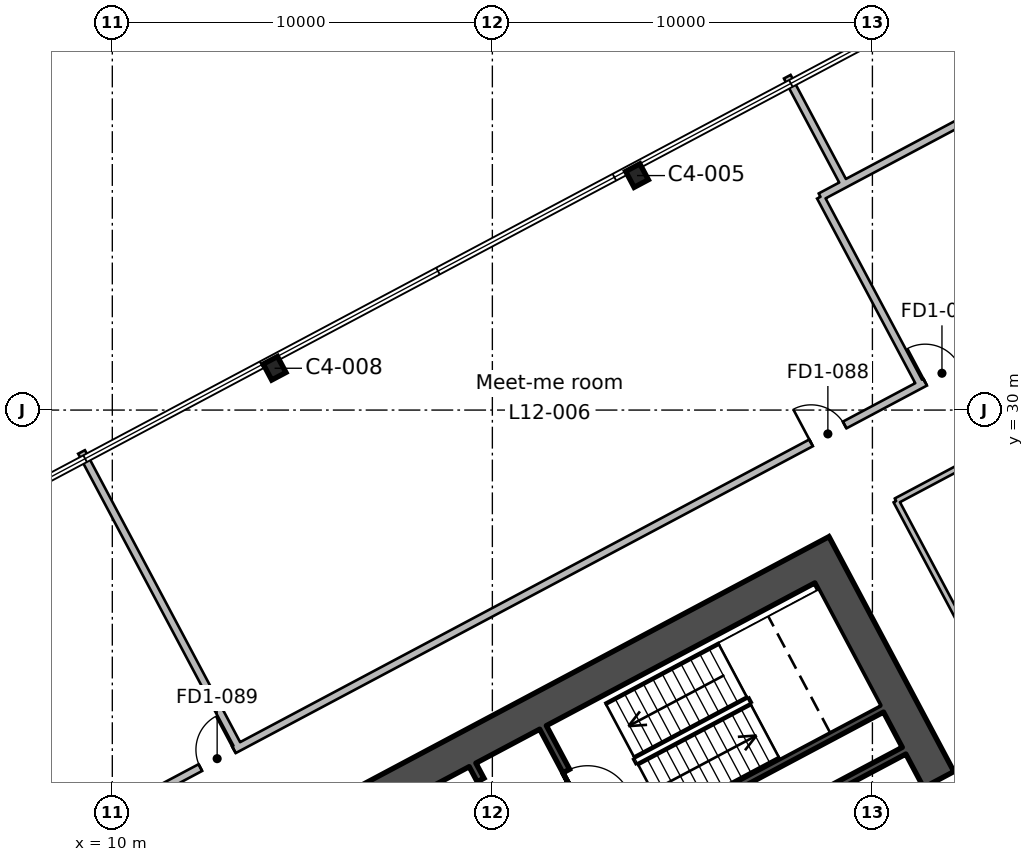
"""IFC4 building model, lengths in metres.
Left out: names, types, materials, properties, quantities, classifications, styles, units other than length and angle.
Written with IfcOpenShell. Run it as: python <this file> out.ifc"""

import sys

from ifc_helpers import new_model, si_unit, direction, frame, frame_2d, origin, origin_2d, place, context, subcontext, project, spatial, rectangle, i_section, extrude, element, fill, save


model = new_model("IFC4")
c1 = context("Model", 3, precision=1e-05, world=origin(), true_north=direction((0.0, 1.0)))
c2 = subcontext(c1, "Body", "Model", "MODEL_VIEW")
j1 = project(units=[si_unit("LENGTHUNIT", "METRE"), si_unit("PLANEANGLEUNIT", "RADIAN")], contexts=[c1])
p1 = place(None, origin())
s1 = spatial("IfcSite", under=j1, at=p1, CompositionType="ELEMENT")
p2 = place(p1, origin())
s2 = spatial("IfcBuilding", under=s1, at=p2, CompositionType="ELEMENT")
p3 = place(p2, frame((0.0, 0.0, 66.2)))
s3 = spatial("IfcBuildingStorey", under=s2, at=p3, CompositionType="ELEMENT", Elevation=66.2)
for number, where, z_axis, x_axis in (
    (1, (14.27, 31.1, 0.0), (0.0, 0.0, 1.0), (-0.883, -0.469, 0.0)),
    (2, (23.806, 36.17, 0.0), (0.0, 0.0, 1.0), (-0.883, -0.469, 0.0)),
):
    element("IfcColumn", number, at=place(p3, frame(where, z_axis=z_axis, x_axis=x_axis)), inside=s3, PredefinedType="COLUMN", context=c2, shape_type="SweptSolid", body=[
        extrude(i_section(OverallWidth=0.424, OverallDepth=0.475, WebThickness=0.048, FlangeThickness=0.077, FilletRadius=0.015, at=origin_2d()), origin(), (0.0, 0.0, 1.0), 4.6),
    ])
p4 = place(p3, frame((37.849, 8.799, 0.0), z_axis=(0.0, 0.0, 1.0), x_axis=(-0.469465789982, 0.882950662289, 0.0)))
e3 = element("IfcWall", 3, at=p4, inside=s3, PredefinedType="SHEAR", context=c2, shape_type="SweptSolid", body=[
    extrude(rectangle(XDim=20.0, YDim=0.9, at=frame_2d((10.0, 0.0))), origin(), (0.0, 0.0, 1.0), 4.6),
])
p5 = place(p4, frame((10.6, 0.0, 0.0)))
e4 = element("IfcOpeningElement", 4, at=p5, cuts=e3, PredefinedType="OPENING", context=c2, shape_type="SweptSolid", body=[
    extrude(rectangle(XDim=2.4, YDim=2.4, at=frame_2d((1.2, 1.2))), frame((0.0, 0.46, 0.0), z_axis=(0.0, -1.0, 0.0), x_axis=(1.0, 0.0, 0.0)), (0.0, 0.0, 1.0), 0.92),
])
p6 = place(p3, frame((10.438, 16.366, 0.0), z_axis=(0.0, 0.0, 1.0), x_axis=(0.88294509198, 0.469476266226, 0.0)))
e5 = element("IfcWall", 5, at=p6, inside=s3, PredefinedType="SHEAR", context=c2, shape_type="SweptSolid", body=[
    extrude(rectangle(XDim=20.2, YDim=0.9, at=frame_2d((10.1, 0.0))), origin(), (0.0, 0.0, 1.0), 4.6),
])
p7 = place(p3, frame((22.906, 14.218, 0.0), z_axis=(0.0, 0.0, 1.0), x_axis=(-0.469480409012, 0.88294288918, 0.0)))
e6 = element("IfcWall", 6, at=p7, inside=s3, PredefinedType="SHEAR", context=c2, shape_type="SweptSolid", body=[
    extrude(rectangle(XDim=7.3, YDim=0.2, at=frame_2d((3.65, 0.0))), origin(), (0.0, 0.0, 1.0), 4.6),
])
p8 = place(p7, frame((2.6, 0.0, 0.0)))
e7 = element("IfcOpeningElement", 7, at=p8, cuts=e6, PredefinedType="OPENING", context=c2, shape_type="SweptSolid", body=[
    extrude(rectangle(XDim=0.9, YDim=2.1, at=frame_2d((0.45, 1.05))), frame((0.0, 0.11, 0.0), z_axis=(0.0, -1.0, 0.0), x_axis=(1.0, 0.0, 0.0)), (0.0, 0.0, 1.0), 0.22),
])
p9 = place(p7, frame((4.2, 0.0, 0.0)))
e8 = element("IfcOpeningElement", 8, at=p9, cuts=e6, PredefinedType="OPENING", context=c2, shape_type="SweptSolid", body=[
    extrude(rectangle(XDim=0.9, YDim=2.1, at=frame_2d((0.45, 1.05))), frame((0.0, 0.11, 0.0), z_axis=(0.0, -1.0, 0.0), x_axis=(1.0, 0.0, 0.0)), (0.0, 0.0, 1.0), 0.22),
])
p10 = place(p7, frame((5.95, 0.0, 0.0)))
e9 = element("IfcOpeningElement", 9, at=p10, cuts=e6, PredefinedType="OPENING", context=c2, shape_type="SweptSolid", body=[
    extrude(rectangle(XDim=0.9, YDim=2.1, at=frame_2d((0.45, 1.05))), frame((0.0, 0.11, 0.0), z_axis=(0.0, -1.0, 0.0), x_axis=(1.0, 0.0, 0.0)), (0.0, 0.0, 1.0), 0.22),
])
p11 = place(p3, frame((24.76, 15.204, 0.0), z_axis=(0.0, 0.0, 1.0), x_axis=(-0.469494272526, 0.882935517501, 0.0)))
e10 = element("IfcWall", 10, at=p11, inside=s3, PredefinedType="SHEAR", context=c2, shape_type="SweptSolid", body=[
    extrude(rectangle(XDim=7.3, YDim=0.2, at=frame_2d((3.65, 0.0))), origin(), (0.0, 0.0, 1.0), 4.6),
])
p12 = place(p11, frame((4.8, 0.0, 0.0)))
e11 = element("IfcOpeningElement", 11, at=p12, cuts=e10, PredefinedType="OPENING", context=c2, shape_type="SweptSolid", body=[
    extrude(rectangle(XDim=1.2, YDim=2.1, at=frame_2d((0.6, 1.05))), frame((0.0, 0.11, 0.0), z_axis=(0.0, -1.0, 0.0), x_axis=(1.0, 0.0, 0.0)), (0.0, 0.0, 1.0), 0.22),
])
p13 = place(p3, frame((23.769, 17.282, 0.0), z_axis=(0.0, 0.0, 1.0), x_axis=(0.882940221191, 0.469485426614, 0.0)))
e12 = element("IfcWall", 12, at=p13, inside=s3, PredefinedType="SHEAR", context=c2, shape_type="SweptSolid", body=[
    extrude(rectangle(XDim=8.0, YDim=0.2, at=frame_2d((4.0, 0.0))), origin(), (0.0, 0.0, 1.0), 4.6),
])
p14 = place(p3, frame((23.182, 18.385, 0.0), z_axis=(0.0, 0.0, 1.0), x_axis=(0.88295287151, 0.469461634952, 0.0)))
e13 = element("IfcWall", 13, at=p14, inside=s3, PredefinedType="SHEAR", context=c2, shape_type="SweptSolid", body=[
    extrude(rectangle(XDim=8.0, YDim=0.2, at=frame_2d((4.0, 0.0))), origin(), (0.0, 0.0, 1.0), 4.6),
])
p15 = place(p3, frame((0.0, 14.044, 0.0), z_axis=(0.0, 0.0, 1.0), x_axis=(0.882943219941, 0.469479786955, 0.0)))
e14 = element("IfcWall", 14, at=p15, inside=s3, PredefinedType="PARTITIONING", context=c2, shape_type="SweptSolid", body=[
    extrude(rectangle(XDim=65.607, YDim=0.2, at=frame_2d((32.803, 0.0))), origin(), (0.0, 0.0, 1.0), 4.2),
])
p16 = place(p15, frame((35.55, 0.0, 0.0)))
e15 = element("IfcOpeningElement", 15, at=p16, cuts=e14, PredefinedType="OPENING", context=c2, shape_type="SweptSolid", body=[
    extrude(rectangle(XDim=1.0, YDim=2.1, at=frame_2d((0.5, 1.05))), frame((0.0, 0.11, 0.0), z_axis=(0.0, -1.0, 0.0), x_axis=(1.0, 0.0, 0.0)), (0.0, 0.0, 1.0), 0.22),
])
p17 = place(p15, frame((32.15, 0.0, 0.0)))
e16 = element("IfcOpeningElement", 16, at=p17, cuts=e14, PredefinedType="OPENING", context=c2, shape_type="SweptSolid", body=[
    extrude(rectangle(XDim=1.0, YDim=2.1, at=frame_2d((0.5, 1.05))), frame((0.0, 0.11, 0.0), z_axis=(0.0, -1.0, 0.0), x_axis=(1.0, 0.0, 0.0)), (0.0, 0.0, 1.0), 0.22),
])
p18 = place(p15, frame((13.95, 0.0, 0.0)))
e17 = element("IfcOpeningElement", 17, at=p18, cuts=e14, PredefinedType="OPENING", context=c2, shape_type="SweptSolid", body=[
    extrude(rectangle(XDim=1.0, YDim=2.1, at=frame_2d((0.5, 1.05))), frame((0.0, 0.11, 0.0), z_axis=(0.0, -1.0, 0.0), x_axis=(1.0, 0.0, 0.0)), (0.0, 0.0, 1.0), 0.22),
])
p19 = place(p3, frame((9.191, 28.898, 0.0), z_axis=(0.0, 0.0, 1.0), x_axis=(0.46939995126, -0.882985665658, 0.0)))
e18 = element("IfcWall", 18, at=p19, inside=s3, PredefinedType="PARTITIONING", context=c2, shape_type="SweptSolid", body=[
    extrude(rectangle(XDim=8.801, YDim=0.2, at=frame_2d((4.4, 0.0))), origin(), (0.0, 0.0, 1.0), 4.2),
])
p20 = place(p3, frame((30.249, 32.572, 0.0), z_axis=(0.0, 0.0, 1.0), x_axis=(0.469290296872, -0.883043949791, 0.0)))
e19 = element("IfcWall", 19, at=p20, inside=s3, PredefinedType="PARTITIONING", context=c2, shape_type="SweptSolid", body=[
    extrude(rectangle(XDim=2.158, YDim=0.2, at=frame_2d((1.079, 0.0))), origin(), (0.0, 0.0, 1.0), 4.2),
])
p21 = place(p3, frame((69.57, 22.948, 0.0), z_axis=(0.0, 0.0, 1.0), x_axis=(-0.882939582192, -0.469486628349, 0.0)))
e20 = element("IfcWall", 20, at=p21, inside=s3, PredefinedType="PARTITIONING", context=c2, shape_type="SweptSolid", body=[
    extrude(rectangle(XDim=63.39, YDim=0.2, at=frame_2d((31.695, 0.0))), origin(), (0.0, 0.0, 1.0), 4.2),
])
p22 = place(p21, frame((41.971, 0.0, 0.0)))
e21 = element("IfcOpeningElement", 21, at=p22, cuts=e20, PredefinedType="OPENING", context=c2, shape_type="SweptSolid", body=[
    extrude(rectangle(XDim=1.0, YDim=2.1, at=frame_2d((0.5, 1.05))), frame((0.0, 0.11, 0.0), z_axis=(0.0, -1.0, 0.0), x_axis=(1.0, 0.0, 0.0)), (0.0, 0.0, 1.0), 0.22),
])
p23 = place(p21, frame((31.371, 0.0, 0.0)))
e22 = element("IfcOpeningElement", 22, at=p23, cuts=e20, PredefinedType="OPENING", context=c2, shape_type="SweptSolid", body=[
    extrude(rectangle(XDim=1.0, YDim=2.1, at=frame_2d((0.5, 1.05))), frame((0.0, 0.11, 0.0), z_axis=(0.0, -1.0, 0.0), x_axis=(1.0, 0.0, 0.0)), (0.0, 0.0, 1.0), 0.22),
])
p24 = place(p21, frame((24.071, 0.0, 0.0)))
e23 = element("IfcOpeningElement", 23, at=p24, cuts=e20, PredefinedType="OPENING", context=c2, shape_type="SweptSolid", body=[
    extrude(rectangle(XDim=1.0, YDim=2.1, at=frame_2d((0.5, 1.05))), frame((0.0, 0.11, 0.0), z_axis=(0.0, -1.0, 0.0), x_axis=(1.0, 0.0, 0.0)), (0.0, 0.0, 1.0), 0.22),
])
p25 = place(p21, frame((13.071, 0.0, 0.0)))
e24 = element("IfcOpeningElement", 24, at=p25, cuts=e20, PredefinedType="OPENING", context=c2, shape_type="SweptSolid", body=[
    extrude(rectangle(XDim=1.0, YDim=2.1, at=frame_2d((0.5, 1.05))), frame((0.0, 0.11, 0.0), z_axis=(0.0, -1.0, 0.0), x_axis=(1.0, 0.0, 0.0)), (0.0, 0.0, 1.0), 0.22),
])
p26 = place(p3, frame((27.76, 38.771, 0.0), z_axis=(0.0, 0.0, 1.0), x_axis=(0.469320691295, -0.883027796121, 0.0)))
e25 = element("IfcWall", 25, at=p26, inside=s3, PredefinedType="PARTITIONING", context=c2, shape_type="SweptSolid", body=[
    extrude(rectangle(XDim=3.2, YDim=0.2, at=frame_2d((1.6, 0.0))), origin(), (0.0, 0.0, 1.0), 4.2),
])
p27 = place(p3, frame((29.26, 35.945, 0.0), z_axis=(0.0, 0.0, 1.0), x_axis=(0.882968820758, 0.469431636737, 0.0)))
e26 = element("IfcWall", 26, at=p27, inside=s3, PredefinedType="PARTITIONING", context=c2, shape_type="SweptSolid", body=[
    extrude(rectangle(XDim=23.29, YDim=0.2, at=frame_2d((11.645, 0.0))), origin(), (0.0, 0.0, 1.0), 4.2),
])
p28 = place(p3, frame((30.249, 32.572, 0.0), z_axis=(0.0, 0.0, 1.0), x_axis=(-0.46948710086, 0.882939330943, 0.0)))
e27 = element("IfcWall", 27, at=p28, inside=s3, PredefinedType="PARTITIONING", context=c2, shape_type="SweptSolid", body=[
    extrude(rectangle(XDim=3.442, YDim=0.2, at=frame_2d((1.721, 0.0))), origin(), (0.0, 0.0, 1.0), 4.2),
])
p29 = place(p3, frame((28.633, 35.611, 0.0), z_axis=(0.0, 0.0, 1.0), x_axis=(0.882581167339, 0.470160061106, 0.0)))
e28 = element("IfcWall", 28, at=p29, inside=s3, PredefinedType="PARTITIONING", context=c2, shape_type="SweptSolid", body=[
    extrude(rectangle(XDim=0.71, YDim=0.2, at=frame_2d((0.355, 0.0))), origin(), (0.0, 0.0, 1.0), 4.2),
])
p30 = place(p3, frame((30.623, 27.608, 0.0), z_axis=(0.0, 0.0, 1.0), x_axis=(0.882940863385, 0.469484218867, 0.0)))
e29 = element("IfcWall", 29, at=p30, inside=s3, PredefinedType="PARTITIONING", context=c2, shape_type="SweptSolid", body=[
    extrude(rectangle(XDim=10.0, YDim=0.15, at=frame_2d((5.0, 0.0))), origin(), (0.0, 0.0, 1.0), 4.2),
])
p31 = place(p3, frame((40.013, 9.949, 0.0), z_axis=(0.0, 0.0, 1.0), x_axis=(-0.469489882812, 0.882937851685, 0.0)))
e30 = element("IfcWall", 30, at=p31, inside=s3, PredefinedType="PARTITIONING", context=c2, shape_type="SweptSolid", body=[
    extrude(rectangle(XDim=20.0, YDim=0.15, at=frame_2d((10.0, 0.0))), origin(), (0.0, 0.0, 1.0), 4.2),
])
p32 = place(p31, frame((9.55, 0.0, 0.0)))
e31 = element("IfcOpeningElement", 31, at=p32, cuts=e30, PredefinedType="OPENING", context=c2, shape_type="SweptSolid", body=[
    extrude(rectangle(XDim=1.0, YDim=2.1, at=frame_2d((0.5, 1.05))), frame((0.0, 0.085, 0.0), z_axis=(0.0, -1.0, 0.0), x_axis=(1.0, 0.0, 0.0)), (0.0, 0.0, 1.0), 0.17),
])
p33 = place(p5, origin())
e32 = element("IfcDoor", 32, at=p33, inside=s3, OperationType="DOUBLE_DOOR_SINGLE_SWING", PredefinedType="DOOR", context=c2, shape_type="SweptSolid", body=[
    extrude(rectangle(XDim=2.4, YDim=2.4, at=frame_2d((1.2, 1.2))), frame((0.0, 0.025, 0.0), z_axis=(0.0, -1.0, 0.0), x_axis=(1.0, 0.0, 0.0)), (0.0, 0.0, 1.0), 0.05),
])
fill(e4, e32)
p34 = place(p12, frame((1.2, 0.0, 0.0), z_axis=(0.0, 0.0, 1.0), x_axis=(-1.0, 0.0, 0.0)))
e33 = element("IfcDoor", 33, at=p34, inside=s3, OperationType="SINGLE_SWING_RIGHT", PredefinedType="DOOR", context=c2, shape_type="SweptSolid", body=[
    extrude(rectangle(XDim=1.2, YDim=2.1, at=frame_2d((0.6, 1.05))), frame((0.0, 0.025, 0.0), z_axis=(0.0, -1.0, 0.0), x_axis=(1.0, 0.0, 0.0)), (0.0, 0.0, 1.0), 0.05),
])
fill(e11, e33)
p35 = place(p10, origin())
e34 = element("IfcDoor", 34, at=p35, inside=s3, OperationType="SINGLE_SWING_LEFT", PredefinedType="DOOR", context=c2, shape_type="SweptSolid", body=[
    extrude(rectangle(XDim=0.9, YDim=2.1, at=frame_2d((0.45, 1.05))), frame((0.0, 0.025, 0.0), z_axis=(0.0, -1.0, 0.0), x_axis=(1.0, 0.0, 0.0)), (0.0, 0.0, 1.0), 0.05),
])
fill(e9, e34)
p36 = place(p16, origin())
e35 = element("IfcDoor", 35, at=p36, inside=s3, OperationType="SINGLE_SWING_LEFT", PredefinedType="DOOR", context=c2, shape_type="SweptSolid", body=[
    extrude(rectangle(XDim=1.0, YDim=2.1, at=frame_2d((0.5, 1.05))), frame((0.0, 0.025, 0.0), z_axis=(0.0, -1.0, 0.0), x_axis=(1.0, 0.0, 0.0)), (0.0, 0.0, 1.0), 0.05),
])
fill(e15, e35)
p37 = place(p17, origin())
e36 = element("IfcDoor", 36, at=p37, inside=s3, OperationType="SINGLE_SWING_LEFT", PredefinedType="DOOR", context=c2, shape_type="SweptSolid", body=[
    extrude(rectangle(XDim=1.0, YDim=2.1, at=frame_2d((0.5, 1.05))), frame((0.0, 0.025, 0.0), z_axis=(0.0, -1.0, 0.0), x_axis=(1.0, 0.0, 0.0)), (0.0, 0.0, 1.0), 0.05),
])
fill(e16, e36)
p38 = place(p18, origin())
e37 = element("IfcDoor", 37, at=p38, inside=s3, OperationType="SINGLE_SWING_RIGHT", PredefinedType="DOOR", context=c2, shape_type="SweptSolid", body=[
    extrude(rectangle(XDim=1.0, YDim=2.1, at=frame_2d((0.5, 1.05))), frame((0.0, 0.025, 0.0), z_axis=(0.0, -1.0, 0.0), x_axis=(1.0, 0.0, 0.0)), (0.0, 0.0, 1.0), 0.05),
])
fill(e17, e37)
save(model, sys.argv[1])
